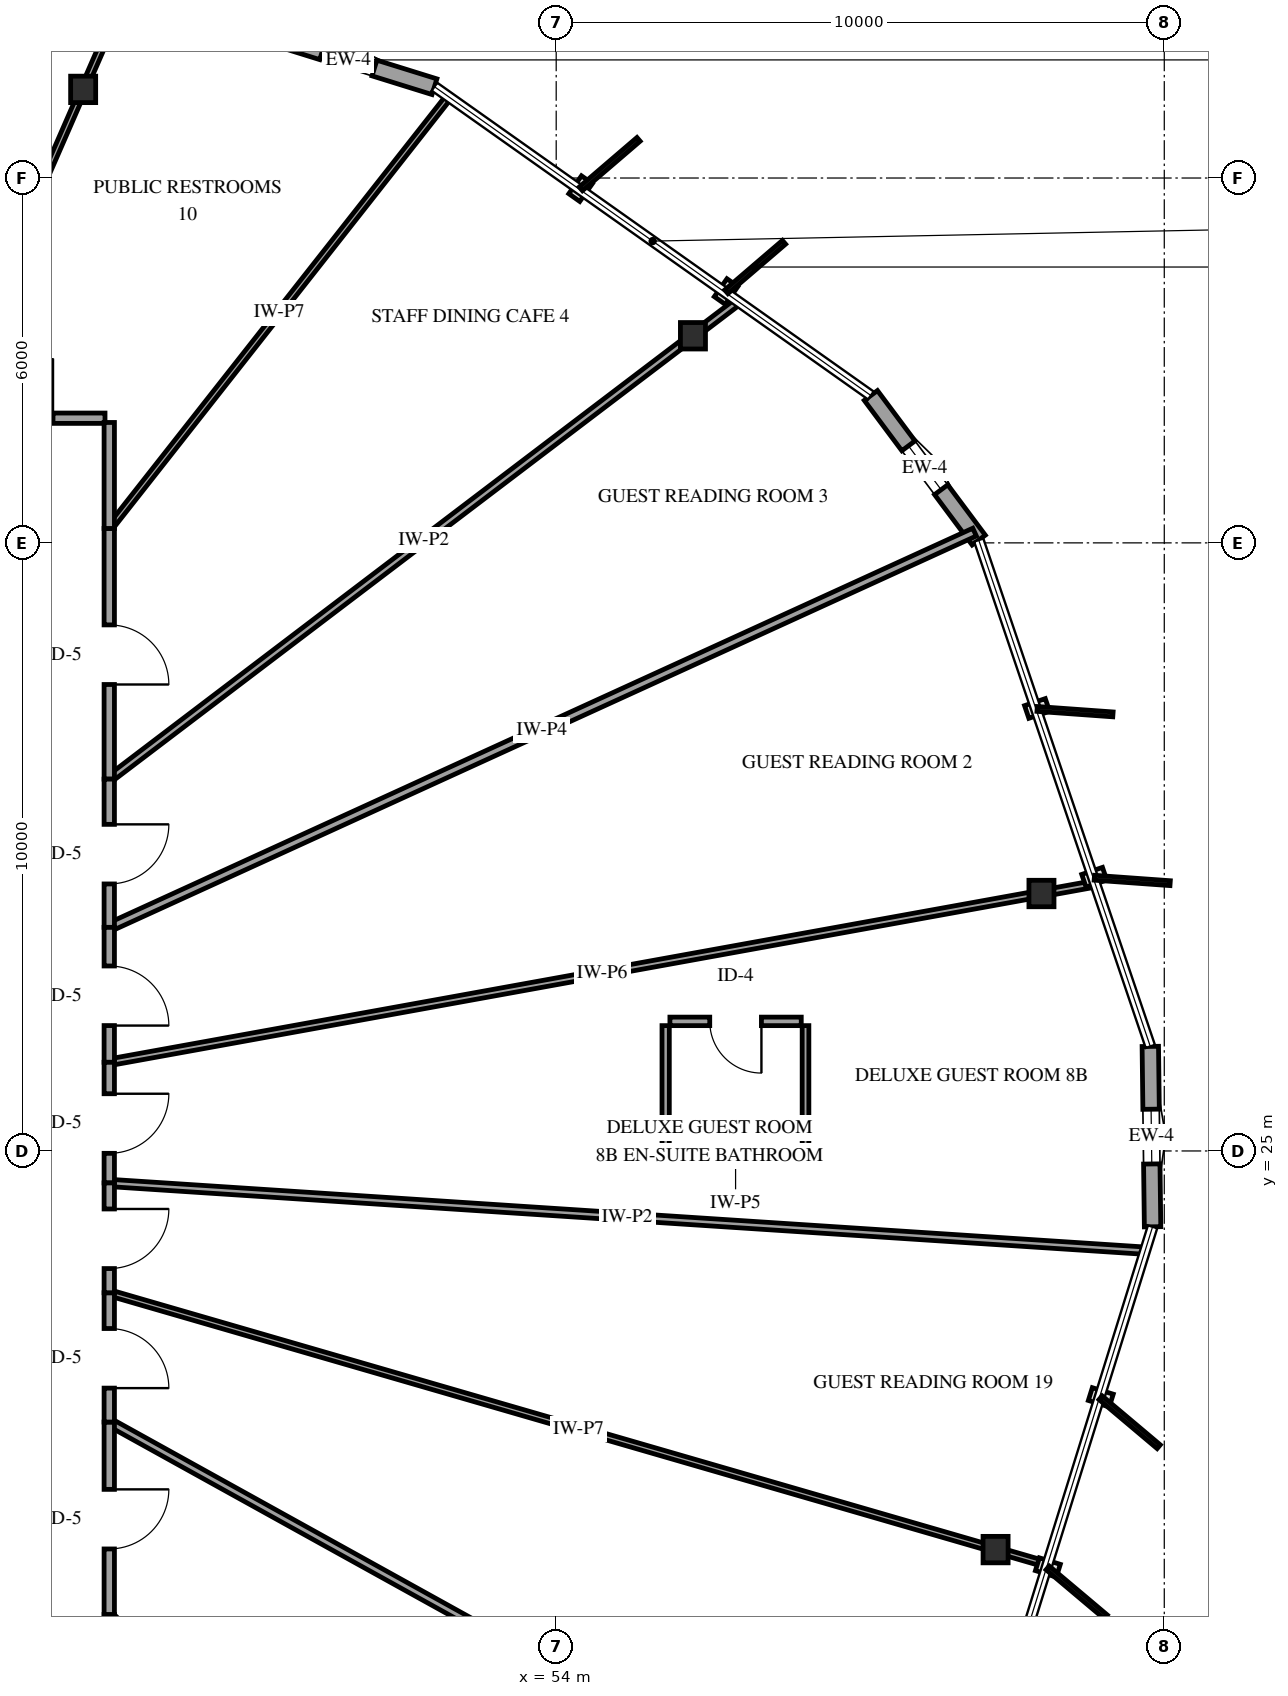
"""IFC4 building model, lengths in metres.
Left out: names, types, materials, properties, quantities, classifications, styles, units other than length and angle.
Written with IfcOpenShell. Run it as: python <this file> out.ifc"""

import sys

from ifc_helpers import new_model, si_unit, direction, frame, frame_2d, origin, origin_2d, place, context, subcontext, project, spatial, rectangle, i_section, extrude, element, fill, save


model = new_model("IFC4")
c1 = context("Model", 3, precision=1e-05, world=origin(), true_north=direction((0.0, 1.0)))
c2 = subcontext(c1, "Body", "Model", "MODEL_VIEW")
j1 = project(units=[si_unit("LENGTHUNIT", "METRE"), si_unit("PLANEANGLEUNIT", "RADIAN")], contexts=[c1])
p1 = place(None, origin())
s1 = spatial("IfcSite", under=j1, at=p1, CompositionType="ELEMENT")
p2 = place(p1, origin())
s2 = spatial("IfcBuilding", under=s1, at=p2, CompositionType="ELEMENT")
p3 = place(p2, frame((0.0, 0.0, 167.8)))
s3 = spatial("IfcBuildingStorey", under=s2, at=p3, CompositionType="ELEMENT", Elevation=167.8)
for number, where, z_axis, x_axis in (
    (1, (61.98, 29.234, 0.0), (0.0, 0.0, 1.0), (1.0, 0.0, 0.0)),
    (2, (56.249, 38.406, 0.0), (0.0, 0.0, 1.0), (1.0, 0.0, 0.0)),
    (3, (46.221, 42.458, 0.0), (0.0, 0.0, 1.0), (1.0, 0.0, 0.0)),
    (4, (61.226, 18.444, 0.0), (0.0, 0.0, 1.0), (1.0, 0.0, 0.0)),
):
    element("IfcColumn", number, at=place(p3, frame(where, z_axis=z_axis, x_axis=x_axis)), inside=s3, PredefinedType="COLUMN", context=c2, shape_type="SweptSolid", body=[
        extrude(i_section(OverallWidth=0.412, OverallDepth=0.435, WebThickness=0.036, FlangeThickness=0.057, FilletRadius=0.038, at=origin_2d()), origin(), (0.0, 0.0, 1.0), 3.6),
    ])
p4 = place(p3, frame((51.998, 42.502, 0.0), z_axis=(0.0, 0.0, 1.0), x_axis=(-0.954868707694, 0.29702819911, 0.0)))
e5 = element("IfcWall", 5, at=p4, inside=s3, PredefinedType="SOLIDWALL", context=c2, shape_type="SweptSolid", body=[
    extrude(rectangle(XDim=2.966, YDim=0.27, at=frame_2d((1.483, 0.0))), origin(), (0.0, 0.0, 1.0), 2.679),
])
p5 = place(p4, frame((1.033, 0.0, 0.75)))
e6 = element("IfcOpeningElement", 6, at=p5, cuts=e5, PredefinedType="OPENING", context=c2, shape_type="SweptSolid", body=[
    extrude(rectangle(XDim=0.9, YDim=1.5, at=frame_2d((0.45, 0.75))), frame((0.0, 0.145, 0.0), z_axis=(0.0, -1.0, 0.0), x_axis=(1.0, 0.0, 0.0)), (0.0, 0.0, 1.0), 0.29),
])
p6 = place(p3, frame((63.808, 23.753, 0.0), z_axis=(0.0, 0.0, 1.0), x_axis=(-0.012591594286, 0.999920722734, 0.0)))
e7 = element("IfcWall", 7, at=p6, inside=s3, PredefinedType="SOLIDWALL", context=c2, shape_type="SweptSolid", body=[
    extrude(rectangle(XDim=2.967, YDim=0.27, at=frame_2d((1.483, 0.0))), origin(), (0.0, 0.0, 1.0), 2.679),
])
p7 = place(p6, frame((1.033, 0.0, 0.75)))
e8 = element("IfcOpeningElement", 8, at=p7, cuts=e7, PredefinedType="OPENING", context=c2, shape_type="SweptSolid", body=[
    extrude(rectangle(XDim=0.9, YDim=1.5, at=frame_2d((0.45, 0.75))), frame((0.0, 0.145, 0.0), z_axis=(0.0, -1.0, 0.0), x_axis=(1.0, 0.0, 0.0)), (0.0, 0.0, 1.0), 0.29),
])
p8 = place(p3, frame((60.948, 35.046, 0.0), z_axis=(0.0, 0.0, 1.0), x_axis=(-0.597891104192, 0.80157733721, 0.0)))
e9 = element("IfcWall", 9, at=p8, inside=s3, PredefinedType="SOLIDWALL", context=c2, shape_type="SweptSolid", body=[
    extrude(rectangle(XDim=2.967, YDim=0.27, at=frame_2d((1.483, 0.0))), origin(), (0.0, 0.0, 1.0), 2.679),
])
p9 = place(p8, frame((1.033, 0.0, 0.75)))
e10 = element("IfcOpeningElement", 10, at=p9, cuts=e9, PredefinedType="OPENING", context=c2, shape_type="SweptSolid", body=[
    extrude(rectangle(XDim=0.9, YDim=1.5, at=frame_2d((0.45, 0.75))), frame((0.0, 0.145, 0.0), z_axis=(0.0, -1.0, 0.0), x_axis=(1.0, 0.0, 0.0)), (0.0, 0.0, 1.0), 0.29),
])
p10 = place(p3, frame((63.685, 23.36, 0.0), z_axis=(0.0, 0.0, 1.0), x_axis=(-0.997868582242, 0.065255594198, 0.0)))
e11 = element("IfcWall", 11, at=p10, inside=s3, PredefinedType="PARTITIONING", context=c2, shape_type="SweptSolid", body=[
    extrude(rectangle(XDim=17.072, YDim=0.12, at=frame_2d((8.536, 0.0))), origin(), (0.0, 0.0, 1.0), 3.3),
])
p11 = place(p3, frame((46.65, 26.458, 0.0), z_axis=(0.0, 0.0, 1.0), x_axis=(0.983997671366, 0.17818131986, 0.0)))
e12 = element("IfcWall", 12, at=p11, inside=s3, PredefinedType="PARTITIONING", context=c2, shape_type="SweptSolid", body=[
    extrude(rectangle(XDim=16.478, YDim=0.11, at=frame_2d((8.239, 0.0))), origin(), (0.0, 0.0, 1.0), 2.595),
])
p12 = place(p3, frame((46.65, 22.668, 0.0), z_axis=(0.0, 0.0, 1.0), x_axis=(0.960487742443, -0.278322289113, 0.0)))
e13 = element("IfcWall", 13, at=p12, inside=s3, PredefinedType="PARTITIONING", context=c2, shape_type="SweptSolid", body=[
    extrude(rectangle(XDim=16.064, YDim=0.1, at=frame_2d((8.032, 0.0))), origin(), (0.0, 0.0, 1.0), 3.3),
])
p13 = place(p3, frame((46.65, 28.677, 0.0), z_axis=(0.0, 0.0, 1.0), x_axis=(0.909598522635, 0.41548830022, 0.0)))
e14 = element("IfcWall", 14, at=p13, inside=s3, PredefinedType="PARTITIONING", context=c2, shape_type="SweptSolid", body=[
    extrude(rectangle(XDim=15.644, YDim=0.14, at=frame_2d((7.822, 0.0))), origin(), (0.0, 0.0, 1.0), 3.3),
])
p14 = place(p3, frame((46.65, 20.542, 0.0), z_axis=(0.0, 0.0, 1.0), x_axis=(0.87479400399, -0.484495047016, 0.0)))
e15 = element("IfcWall", 15, at=p14, inside=s3, PredefinedType="PARTITIONING", context=c2, shape_type="SweptSolid", body=[
    extrude(rectangle(XDim=15.03, YDim=0.13, at=frame_2d((7.515, 0.0))), origin(), (0.0, 0.0, 1.0), 3.3),
])
p15 = place(p3, frame((46.65, 31.115, 0.0), z_axis=(0.0, 0.0, 1.0), x_axis=(0.796355255038, 0.604829155856, 0.0)))
e16 = element("IfcWall", 16, at=p15, inside=s3, PredefinedType="PARTITIONING", context=c2, shape_type="SweptSolid", body=[
    extrude(rectangle(XDim=12.986, YDim=0.12, at=frame_2d((6.493, 0.0))), origin(), (0.0, 0.0, 1.0), 3.3),
])
p16 = place(p3, frame((46.65, 17.378, 0.0), z_axis=(0.0, 0.0, 1.0), x_axis=(0.726147344165, -0.687539114932, 0.0)))
e17 = element("IfcWall", 17, at=p16, inside=s3, PredefinedType="PARTITIONING", context=c2, shape_type="SweptSolid", body=[
    extrude(rectangle(XDim=11.401, YDim=0.11, at=frame_2d((5.701, 0.0))), origin(), (0.0, 0.0, 1.0), 2.595),
])
p17 = place(p3, frame((46.65, 35.237, 0.0), z_axis=(0.0, 0.0, 1.0), x_axis=(0.618238163574, 0.785990822529, 0.0)))
e18 = element("IfcWall", 18, at=p17, inside=s3, PredefinedType="PARTITIONING", context=c2, shape_type="SweptSolid", body=[
    extrude(rectangle(XDim=9.031, YDim=0.1, at=frame_2d((4.515, 0.0))), origin(), (0.0, 0.0, 1.0), 3.3),
])
p18 = place(p3, frame((43.86, 37.05, 0.0), z_axis=(0.0, 0.0, 1.0), x_axis=(0.400120171494, 0.916462682472, 0.0)))
e19 = element("IfcWall", 19, at=p18, inside=s3, PredefinedType="PARTITIONING", context=c2, shape_type="SweptSolid", body=[
    extrude(rectangle(XDim=6.875, YDim=0.1, at=frame_2d((3.438, 0.0))), origin(), (0.0, 0.0, 1.0), 2.595),
])
p19 = place(p3, frame((46.65, 17.378, 0.0), z_axis=(0.0, 0.0, 1.0), x_axis=(0.0, -1.0, 0.0)))
e20 = element("IfcWall", 20, at=p19, inside=s3, PredefinedType="PARTITIONING", context=c2, shape_type="SweptSolid", body=[
    extrude(rectangle(XDim=4.358, YDim=0.17, at=frame_2d((2.179, 0.0))), origin(), (0.0, 0.0, 1.0), 3.3),
])
p20 = place(p19, frame((1.704, 0.0, 0.0)))
e21 = element("IfcOpeningElement", 21, at=p20, cuts=e20, PredefinedType="OPENING", context=c2, shape_type="SweptSolid", body=[
    extrude(rectangle(XDim=0.98, YDim=2.15, at=frame_2d((0.49, 1.075))), frame((0.0, 0.095, 0.0), z_axis=(0.0, -1.0, 0.0), x_axis=(1.0, 0.0, 0.0)), (0.0, 0.0, 1.0), 0.19),
])
p21 = place(p3, frame((46.65, 35.237, 0.0), z_axis=(0.0, 0.0, 1.0), x_axis=(0.0, -1.0, 0.0)))
e22 = element("IfcWall", 22, at=p21, inside=s3, PredefinedType="PARTITIONING", context=c2, shape_type="SweptSolid", body=[
    extrude(rectangle(XDim=4.122, YDim=0.17, at=frame_2d((2.061, 0.0))), origin(), (0.0, 0.0, 1.0), 3.3),
])
p22 = place(p21, frame((1.586, 0.0, 0.0)))
e23 = element("IfcOpeningElement", 23, at=p22, cuts=e22, PredefinedType="OPENING", context=c2, shape_type="SweptSolid", body=[
    extrude(rectangle(XDim=0.98, YDim=2.15, at=frame_2d((0.49, 1.075))), frame((0.0, 0.095, 0.0), z_axis=(0.0, -1.0, 0.0), x_axis=(1.0, 0.0, 0.0)), (0.0, 0.0, 1.0), 0.19),
])
p23 = place(p3, frame((46.65, 20.542, 0.0), z_axis=(0.0, 0.0, 1.0), x_axis=(0.0, -1.0, 0.0)))
e24 = element("IfcWall", 24, at=p23, inside=s3, PredefinedType="PARTITIONING", context=c2, shape_type="SweptSolid", body=[
    extrude(rectangle(XDim=3.164, YDim=0.17, at=frame_2d((1.582, 0.0))), origin(), (0.0, 0.0, 1.0), 3.3),
])
p24 = place(p23, frame((1.107, 0.0, 0.0)))
e25 = element("IfcOpeningElement", 25, at=p24, cuts=e24, PredefinedType="OPENING", context=c2, shape_type="SweptSolid", body=[
    extrude(rectangle(XDim=0.98, YDim=2.15, at=frame_2d((0.49, 1.075))), frame((0.0, 0.095, 0.0), z_axis=(0.0, -1.0, 0.0), x_axis=(1.0, 0.0, 0.0)), (0.0, 0.0, 1.0), 0.19),
])
p25 = place(p3, frame((43.86, 37.05, 0.0), z_axis=(0.0, 0.0, 1.0), x_axis=(1.0, 0.0, 0.0)))
e26 = element("IfcWall", 26, at=p25, inside=s3, PredefinedType="PARTITIONING", context=c2, shape_type="SweptSolid", body=[
    extrude(rectangle(XDim=2.72, YDim=0.17, at=frame_2d((1.36, 0.0))), origin(), (0.0, 0.0, 1.0), 3.3),
])
p26 = place(p25, frame((0.885, 0.0, 0.0)))
e27 = element("IfcOpeningElement", 27, at=p26, cuts=e26, PredefinedType="OPENING", context=c2, shape_type="SweptSolid", body=[
    extrude(rectangle(XDim=0.98, YDim=2.15, at=frame_2d((0.49, 1.075))), frame((0.0, 0.095, 0.0), z_axis=(0.0, -1.0, 0.0), x_axis=(1.0, 0.0, 0.0)), (0.0, 0.0, 1.0), 0.19),
])
p27 = place(p3, frame((46.65, 31.115, 0.0), z_axis=(0.0, 0.0, 1.0), x_axis=(0.0, -1.0, 0.0)))
e28 = element("IfcWall", 28, at=p27, inside=s3, PredefinedType="PARTITIONING", context=c2, shape_type="SweptSolid", body=[
    extrude(rectangle(XDim=2.438, YDim=0.17, at=frame_2d((1.219, 0.0))), origin(), (0.0, 0.0, 1.0), 3.3),
])
p28 = place(p27, frame((0.744, 0.0, 0.0)))
e29 = element("IfcOpeningElement", 29, at=p28, cuts=e28, PredefinedType="OPENING", context=c2, shape_type="SweptSolid", body=[
    extrude(rectangle(XDim=0.98, YDim=2.15, at=frame_2d((0.49, 1.075))), frame((0.0, 0.095, 0.0), z_axis=(0.0, -1.0, 0.0), x_axis=(1.0, 0.0, 0.0)), (0.0, 0.0, 1.0), 0.19),
])
p29 = place(p3, frame((46.65, 28.677, 0.0), z_axis=(0.0, 0.0, 1.0), x_axis=(0.0, -1.0, 0.0)))
e30 = element("IfcWall", 30, at=p29, inside=s3, PredefinedType="PARTITIONING", context=c2, shape_type="SweptSolid", body=[
    extrude(rectangle(XDim=2.219, YDim=0.17, at=frame_2d((1.109, 0.0))), origin(), (0.0, 0.0, 1.0), 3.3),
])
p30 = place(p29, frame((0.635, 0.0, 0.0)))
e31 = element("IfcOpeningElement", 31, at=p30, cuts=e30, PredefinedType="OPENING", context=c2, shape_type="SweptSolid", body=[
    extrude(rectangle(XDim=0.98, YDim=2.15, at=frame_2d((0.49, 1.075))), frame((0.0, 0.095, 0.0), z_axis=(0.0, -1.0, 0.0), x_axis=(1.0, 0.0, 0.0)), (0.0, 0.0, 1.0), 0.19),
])
p31 = place(p3, frame((58.03, 27.131, 0.0), z_axis=(0.0, 0.0, 1.0), x_axis=(-1.0, 0.0, 0.0)))
e32 = element("IfcWall", 32, at=p31, inside=s3, PredefinedType="PARTITIONING", context=c2, shape_type="SweptSolid", body=[
    extrude(rectangle(XDim=2.16, YDim=0.14, at=frame_2d((1.08, 0.0))), origin(), (0.0, 0.0, 1.0), 3.3),
])
p32 = place(p31, frame((0.655, 0.0, 0.0)))
e33 = element("IfcOpeningElement", 33, at=p32, cuts=e32, PredefinedType="OPENING", context=c2, shape_type="SweptSolid", body=[
    extrude(rectangle(XDim=0.85, YDim=2.1, at=frame_2d((0.425, 1.05))), frame((0.0, 0.08, 0.0), z_axis=(0.0, -1.0, 0.0), x_axis=(1.0, 0.0, 0.0)), (0.0, 0.0, 1.0), 0.16),
])
p33 = place(p3, frame((55.87, 24.831, 0.0), z_axis=(0.0, 0.0, 1.0), x_axis=(1.0, 0.0, 0.0)))
e34 = element("IfcWall", 34, at=p33, inside=s3, PredefinedType="PARTITIONING", context=c2, shape_type="SweptSolid", body=[
    extrude(rectangle(XDim=2.16, YDim=0.13, at=frame_2d((1.08, 0.0))), origin(), (0.0, 0.0, 1.0), 3.3),
])
p34 = place(p3, frame((55.8, 27.061, 0.0), z_axis=(0.0, 0.0, 1.0), x_axis=(0.0, -1.0, 0.0)))
e35 = element("IfcWall", 35, at=p34, inside=s3, PredefinedType="PARTITIONING", context=c2, shape_type="SweptSolid", body=[
    extrude(rectangle(XDim=2.16, YDim=0.12, at=frame_2d((1.08, 0.0))), origin(), (0.0, 0.0, 1.0), 3.3),
])
p35 = place(p3, frame((58.1, 24.901, 0.0), z_axis=(0.0, 0.0, 1.0), x_axis=(0.0, 1.0, 0.0)))
e36 = element("IfcWall", 36, at=p35, inside=s3, PredefinedType="PARTITIONING", context=c2, shape_type="SweptSolid", body=[
    extrude(rectangle(XDim=2.16, YDim=0.11, at=frame_2d((1.08, 0.0))), origin(), (0.0, 0.0, 1.0), 3.3),
])
p36 = place(p3, frame((46.65, 22.668, 0.0), z_axis=(0.0, 0.0, 1.0), x_axis=(0.0, -1.0, 0.0)))
e37 = element("IfcWall", 37, at=p36, inside=s3, PredefinedType="PARTITIONING", context=c2, shape_type="SweptSolid", body=[
    extrude(rectangle(XDim=2.126, YDim=0.17, at=frame_2d((1.063, 0.0))), origin(), (0.0, 0.0, 1.0), 3.3),
])
p37 = place(p36, frame((0.588, 0.0, 0.0)))
e38 = element("IfcOpeningElement", 38, at=p37, cuts=e37, PredefinedType="OPENING", context=c2, shape_type="SweptSolid", body=[
    extrude(rectangle(XDim=0.98, YDim=2.15, at=frame_2d((0.49, 1.075))), frame((0.0, 0.095, 0.0), z_axis=(0.0, -1.0, 0.0), x_axis=(1.0, 0.0, 0.0)), (0.0, 0.0, 1.0), 0.19),
])
p38 = place(p3, frame((46.65, 26.458, 0.0), z_axis=(0.0, 0.0, 1.0), x_axis=(0.0, -1.0, 0.0)))
e39 = element("IfcWall", 39, at=p38, inside=s3, PredefinedType="PARTITIONING", context=c2, shape_type="SweptSolid", body=[
    extrude(rectangle(XDim=1.984, YDim=0.17, at=frame_2d((0.992, 0.0))), origin(), (0.0, 0.0, 1.0), 3.3),
])
p39 = place(p38, frame((0.517, 0.0, 0.0)))
e40 = element("IfcOpeningElement", 40, at=p39, cuts=e39, PredefinedType="OPENING", context=c2, shape_type="SweptSolid", body=[
    extrude(rectangle(XDim=0.98, YDim=2.15, at=frame_2d((0.49, 1.075))), frame((0.0, 0.095, 0.0), z_axis=(0.0, -1.0, 0.0), x_axis=(1.0, 0.0, 0.0)), (0.0, 0.0, 1.0), 0.19),
])
p40 = place(p3, frame((46.65, 24.474, 0.0), z_axis=(0.0, 0.0, 1.0), x_axis=(0.0, -1.0, 0.0)))
e41 = element("IfcWall", 41, at=p40, inside=s3, PredefinedType="PARTITIONING", context=c2, shape_type="SweptSolid", body=[
    extrude(rectangle(XDim=1.806, YDim=0.17, at=frame_2d((0.903, 0.0))), origin(), (0.0, 0.0, 1.0), 3.3),
])
p41 = place(p40, frame((0.428, 0.0, 0.0)))
e42 = element("IfcOpeningElement", 42, at=p41, cuts=e41, PredefinedType="OPENING", context=c2, shape_type="SweptSolid", body=[
    extrude(rectangle(XDim=0.98, YDim=2.15, at=frame_2d((0.49, 1.075))), frame((0.0, 0.095, 0.0), z_axis=(0.0, -1.0, 0.0), x_axis=(1.0, 0.0, 0.0)), (0.0, 0.0, 1.0), 0.19),
])
p42 = place(p3, frame((46.65, 36.98, 0.0), z_axis=(0.0, 0.0, 1.0), x_axis=(0.0, -1.0, 0.0)))
e43 = element("IfcWall", 43, at=p42, inside=s3, PredefinedType="PARTITIONING", context=c2, shape_type="SweptSolid", body=[
    extrude(rectangle(XDim=1.743, YDim=0.17, at=frame_2d((0.872, 0.0))), origin(), (0.0, 0.0, 1.0), 3.3),
])
p43 = place(p5, origin())
e44 = element("IfcWindow", 44, at=p43, inside=s3, PartitioningType="SINGLE_PANEL", PredefinedType="WINDOW", context=c2, shape_type="SweptSolid", body=[
    extrude(rectangle(XDim=0.9, YDim=1.5, at=frame_2d((0.45, 0.75))), frame((0.0, 0.03, 0.0), z_axis=(0.0, -1.0, 0.0), x_axis=(1.0, 0.0, 0.0)), (0.0, 0.0, 1.0), 0.06),
])
fill(e6, e44)
p44 = place(p7, origin())
e45 = element("IfcWindow", 45, at=p44, inside=s3, PartitioningType="SINGLE_PANEL", PredefinedType="WINDOW", context=c2, shape_type="SweptSolid", body=[
    extrude(rectangle(XDim=0.9, YDim=1.5, at=frame_2d((0.45, 0.75))), frame((0.0, 0.03, 0.0), z_axis=(0.0, -1.0, 0.0), x_axis=(1.0, 0.0, 0.0)), (0.0, 0.0, 1.0), 0.06),
])
fill(e8, e45)
p45 = place(p9, origin())
e46 = element("IfcWindow", 46, at=p45, inside=s3, PartitioningType="SINGLE_PANEL", PredefinedType="WINDOW", context=c2, shape_type="SweptSolid", body=[
    extrude(rectangle(XDim=0.9, YDim=1.5, at=frame_2d((0.45, 0.75))), frame((0.0, 0.03, 0.0), z_axis=(0.0, -1.0, 0.0), x_axis=(1.0, 0.0, 0.0)), (0.0, 0.0, 1.0), 0.06),
])
fill(e10, e46)
p46 = place(p22, origin())
e47 = element("IfcDoor", 47, at=p46, inside=s3, OperationType="SINGLE_SWING_RIGHT", PredefinedType="DOOR", context=c2, shape_type="SweptSolid", body=[
    extrude(rectangle(XDim=0.98, YDim=2.15, at=frame_2d((0.49, 1.075))), frame((0.0, 0.025, 0.0), z_axis=(0.0, -1.0, 0.0), x_axis=(1.0, 0.0, 0.0)), (0.0, 0.0, 1.0), 0.05),
])
fill(e23, e47)
p47 = place(p24, origin())
e48 = element("IfcDoor", 48, at=p47, inside=s3, OperationType="SINGLE_SWING_LEFT", PredefinedType="DOOR", context=c2, shape_type="SweptSolid", body=[
    extrude(rectangle(XDim=0.98, YDim=2.15, at=frame_2d((0.49, 1.075))), frame((0.0, 0.025, 0.0), z_axis=(0.0, -1.0, 0.0), x_axis=(1.0, 0.0, 0.0)), (0.0, 0.0, 1.0), 0.05),
])
fill(e25, e48)
p48 = place(p26, origin())
e49 = element("IfcDoor", 49, at=p48, inside=s3, OperationType="SINGLE_SWING_RIGHT", PredefinedType="DOOR", context=c2, shape_type="SweptSolid", body=[
    extrude(rectangle(XDim=0.98, YDim=2.15, at=frame_2d((0.49, 1.075))), frame((0.0, 0.025, 0.0), z_axis=(0.0, -1.0, 0.0), x_axis=(1.0, 0.0, 0.0)), (0.0, 0.0, 1.0), 0.05),
])
fill(e27, e49)
p49 = place(p28, origin())
e50 = element("IfcDoor", 50, at=p49, inside=s3, OperationType="SINGLE_SWING_LEFT", PredefinedType="DOOR", context=c2, shape_type="SweptSolid", body=[
    extrude(rectangle(XDim=0.98, YDim=2.15, at=frame_2d((0.49, 1.075))), frame((0.0, 0.025, 0.0), z_axis=(0.0, -1.0, 0.0), x_axis=(1.0, 0.0, 0.0)), (0.0, 0.0, 1.0), 0.05),
])
fill(e29, e50)
p50 = place(p30, origin())
e51 = element("IfcDoor", 51, at=p50, inside=s3, OperationType="SINGLE_SWING_RIGHT", PredefinedType="DOOR", context=c2, shape_type="SweptSolid", body=[
    extrude(rectangle(XDim=0.98, YDim=2.15, at=frame_2d((0.49, 1.075))), frame((0.0, 0.025, 0.0), z_axis=(0.0, -1.0, 0.0), x_axis=(1.0, 0.0, 0.0)), (0.0, 0.0, 1.0), 0.05),
])
fill(e31, e51)
p51 = place(p32, origin())
e52 = element("IfcDoor", 52, at=p51, inside=s3, OperationType="SINGLE_SWING_LEFT", PredefinedType="DOOR", context=c2, shape_type="SweptSolid", body=[
    extrude(rectangle(XDim=0.85, YDim=2.1, at=frame_2d((0.425, 1.05))), frame((0.0, 0.025, 0.0), z_axis=(0.0, -1.0, 0.0), x_axis=(1.0, 0.0, 0.0)), (0.0, 0.0, 1.0), 0.05),
])
fill(e33, e52)
p52 = place(p37, origin())
e53 = element("IfcDoor", 53, at=p52, inside=s3, OperationType="SINGLE_SWING_RIGHT", PredefinedType="DOOR", context=c2, shape_type="SweptSolid", body=[
    extrude(rectangle(XDim=0.98, YDim=2.15, at=frame_2d((0.49, 1.075))), frame((0.0, 0.025, 0.0), z_axis=(0.0, -1.0, 0.0), x_axis=(1.0, 0.0, 0.0)), (0.0, 0.0, 1.0), 0.05),
])
fill(e38, e53)
p53 = place(p39, origin())
e54 = element("IfcDoor", 54, at=p53, inside=s3, OperationType="SINGLE_SWING_LEFT", PredefinedType="DOOR", context=c2, shape_type="SweptSolid", body=[
    extrude(rectangle(XDim=0.98, YDim=2.15, at=frame_2d((0.49, 1.075))), frame((0.0, 0.025, 0.0), z_axis=(0.0, -1.0, 0.0), x_axis=(1.0, 0.0, 0.0)), (0.0, 0.0, 1.0), 0.05),
])
fill(e40, e54)
p54 = place(p41, origin())
e55 = element("IfcDoor", 55, at=p54, inside=s3, OperationType="SINGLE_SWING_LEFT", PredefinedType="DOOR", context=c2, shape_type="SweptSolid", body=[
    extrude(rectangle(XDim=0.98, YDim=2.15, at=frame_2d((0.49, 1.075))), frame((0.0, 0.025, 0.0), z_axis=(0.0, -1.0, 0.0), x_axis=(1.0, 0.0, 0.0)), (0.0, 0.0, 1.0), 0.05),
])
fill(e42, e55)
save(model, sys.argv[1])
